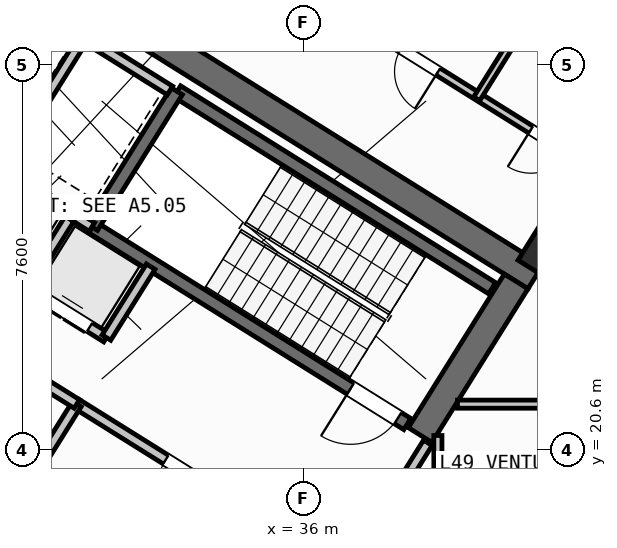
"""IFC4 building model, lengths in metres.
Left out: names, types, materials, properties, quantities, classifications, styles, units other than length and angle.
Written with IfcOpenShell. Run it as: python <this file> out.ifc"""

import sys

from ifc_helpers import new_model, si_unit, direction, frame, frame_2d, origin, origin_2d, place, context, subcontext, project, spatial, rectangle, hollow_rectangle, extrude, source, transform, mapped, element, fill, save


model = new_model("IFC4")
c1 = context("Model", 3, precision=1e-05, world=origin(), true_north=direction((0.0, 1.0)))
c2 = subcontext(c1, "Body", "Model", "MODEL_VIEW")
j1 = project(units=[si_unit("LENGTHUNIT", "METRE"), si_unit("PLANEANGLEUNIT", "RADIAN")], contexts=[c1])
p1 = place(None, origin())
s1 = spatial("IfcSite", under=j1, at=p1, CompositionType="ELEMENT")
p2 = place(p1, origin())
s2 = spatial("IfcBuilding", under=s1, at=p2, CompositionType="ELEMENT")
p3 = place(p2, frame((0.0, 0.0, 195.0)))
s3 = spatial("IfcBuildingStorey", under=s2, at=p3, CompositionType="ELEMENT", Elevation=195.0)
p4 = place(p3, frame((40.573, 24.01, 0.0), z_axis=(0.0, 0.0, 1.0), x_axis=(-0.848047359947, 0.529920442413, 0.0)))
e1 = element("IfcWall", 1, at=p4, inside=s3, PredefinedType="SHEAR", context=c2, shape_type="SweptSolid", body=[
    extrude(rectangle(XDim=13.14, YDim=0.55, at=frame_2d((6.57, 0.0))), origin(), (0.0, 0.0, 1.0), 4.22),
])
p5 = place(p3, frame((40.194, 23.922, 0.0), z_axis=(0.0, 0.0, 1.0), x_axis=(-0.529888438328, -0.848067357541, 0.0)))
e2 = element("IfcWall", 2, at=p5, inside=s3, PredefinedType="SHEAR", context=c2, shape_type="SweptSolid", body=[
    extrude(rectangle(XDim=3.575, YDim=0.55, at=frame_2d((1.788, 0.0))), origin(), (0.0, 0.0, 1.0), 4.22),
])
m1 = source(origin(), c2, "Body", "SweptSolid", [
    extrude(hollow_rectangle(XDim=0.8, YDim=0.8, WallThickness=0.032, at=origin_2d()), origin(), (0.0, 0.0, 1.0), 4.5),
])
p6 = place(p3, frame((40.783, 24.469, 0.0), z_axis=(0.0, 0.0, 1.0), x_axis=(-0.848048096156, 0.529919264233, 0.0)))
e3 = element("IfcColumn", 3, at=p6, inside=s3, PredefinedType="COLUMN", context=c2, shape_type="MappedRepresentation", body=[
    mapped(m1, transform((0.0, 0.0, 0.0), scale=1.0)),
])
p7 = place(p3, frame((31.76, 12.183, 0.0), z_axis=(0.0, 0.0, 1.0), x_axis=(-0.848047074256, 0.529920899612, 0.0)))
e4 = element("IfcWall", 4, at=p7, inside=s3, PredefinedType="STANDARD", context=c2, shape_type="SweptSolid", body=[
    extrude(rectangle(XDim=30.652, YDim=0.32, at=frame_2d((15.326, 0.0))), origin(), (0.0, 0.0, 1.0), 4.22),
])
p8 = place(p7, frame((15.166, 0.0, 0.0)))
e5 = element("IfcOpeningElement", 5, at=p8, cuts=e4, PredefinedType="OPENING", context=c2, shape_type="SweptSolid", body=[
    extrude(rectangle(XDim=1.2, YDim=2.15, at=frame_2d((0.6, 1.075))), frame((0.0, 0.17, 0.0), z_axis=(0.0, -1.0, 0.0), x_axis=(1.0, 0.0, 0.0)), (0.0, 0.0, 1.0), 0.34),
])
p9 = place(p7, frame((1.765, 0.0, 0.7)))
e6 = element("IfcOpeningElement", 6, at=p9, cuts=e4, PredefinedType="OPENING", context=c2, shape_type="SweptSolid", body=[
    extrude(rectangle(XDim=2.6, YDim=2.0, at=frame_2d((1.3, 1.0))), frame((0.0, 0.17, 0.0), z_axis=(0.0, -1.0, 0.0), x_axis=(1.0, 0.0, 0.0)), (0.0, 0.0, 1.0), 0.34),
])
p10 = place(p7, frame((6.994, 0.0, 0.7)))
e7 = element("IfcOpeningElement", 7, at=p10, cuts=e4, PredefinedType="OPENING", context=c2, shape_type="SweptSolid", body=[
    extrude(rectangle(XDim=2.6, YDim=2.0, at=frame_2d((1.3, 1.0))), frame((0.0, 0.17, 0.0), z_axis=(0.0, -1.0, 0.0), x_axis=(1.0, 0.0, 0.0)), (0.0, 0.0, 1.0), 0.34),
])
p11 = place(p7, frame((19.101, 0.0, 0.85)))
e8 = element("IfcOpeningElement", 8, at=p11, cuts=e4, PredefinedType="OPENING", context=c2, shape_type="SweptSolid", body=[
    extrude(rectangle(XDim=1.6, YDim=1.8, at=frame_2d((0.8, 0.9))), frame((0.0, 0.17, 0.0), z_axis=(0.0, -1.0, 0.0), x_axis=(1.0, 0.0, 0.0)), (0.0, 0.0, 1.0), 0.34),
])
p12 = place(p7, frame((26.358, 0.0, 0.7)))
e9 = element("IfcOpeningElement", 9, at=p12, cuts=e4, PredefinedType="OPENING", context=c2, shape_type="SweptSolid", body=[
    extrude(rectangle(XDim=2.6, YDim=2.0, at=frame_2d((1.3, 1.0))), frame((0.0, 0.17, 0.0), z_axis=(0.0, -1.0, 0.0), x_axis=(1.0, 0.0, 0.0)), (0.0, 0.0, 1.0), 0.34),
])
p13 = place(p3, frame((31.28, 18.261, 0.0), z_axis=(0.0, 0.0, 1.0), x_axis=(-0.848051618787, 0.529913626805, 0.0)))
e10 = element("IfcWall", 10, at=p13, inside=s3, PredefinedType="SHEAR", context=c2, shape_type="SweptSolid", body=[
    extrude(rectangle(XDim=7.46, YDim=0.26, at=frame_2d((3.73, 0.0))), origin(), (0.0, 0.0, 1.0), 4.22),
])
p14 = place(p13, frame((0.36, 0.0, 0.0)))
e11 = element("IfcOpeningElement", 11, at=p14, cuts=e10, PredefinedType="OPENING", context=c2, shape_type="SweptSolid", body=[
    extrude(rectangle(XDim=0.86, YDim=2.05, at=frame_2d((0.43, 1.025))), frame((0.0, 0.14, 0.0), z_axis=(0.0, -1.0, 0.0), x_axis=(1.0, 0.0, 0.0)), (0.0, 0.0, 1.0), 0.28),
])
p15 = place(p3, frame((39.721, 23.788, 0.0), z_axis=(0.0, 0.0, 1.0), x_axis=(-0.848054434086, 0.529909121291, 0.0)))
e12 = element("IfcWall", 12, at=p15, inside=s3, PredefinedType="SHEAR", context=c2, shape_type="SweptSolid", body=[
    extrude(rectangle(XDim=7.33, YDim=0.26, at=frame_2d((3.665, 0.0))), origin(), (0.0, 0.0, 1.0), 4.22),
])
p16 = place(p3, frame((38.046, 21.108, 0.0), z_axis=(0.0, 0.0, 1.0), x_axis=(-0.848054434086, 0.529909121291, 0.0)))
e13 = element("IfcWall", 13, at=p16, inside=s3, PredefinedType="SHEAR", context=c2, shape_type="SweptSolid", body=[
    extrude(rectangle(XDim=7.33, YDim=0.26, at=frame_2d((3.665, 0.0))), origin(), (0.0, 0.0, 1.0), 4.22),
])
p17 = place(p16, frame((0.22, 0.0, 0.0)))
e14 = element("IfcOpeningElement", 14, at=p17, cuts=e13, PredefinedType="OPENING", context=c2, shape_type="SweptSolid", body=[
    extrude(rectangle(XDim=1.1, YDim=2.1, at=frame_2d((0.55, 1.05))), frame((0.0, 0.14, 0.0), z_axis=(0.0, -1.0, 0.0), x_axis=(1.0, 0.0, 0.0)), (0.0, 0.0, 1.0), 0.28),
])
p18 = place(p3, frame((33.496, 27.677, 0.0), z_axis=(0.0, 0.0, 1.0), x_axis=(-0.529908658664, -0.84805472316, 0.0)))
e15 = element("IfcWall", 15, at=p18, inside=s3, PredefinedType="SHEAR", context=c2, shape_type="SweptSolid", body=[
    extrude(rectangle(XDim=3.16, YDim=0.26, at=frame_2d((1.58, 0.0))), origin(), (0.0, 0.0, 1.0), 4.22),
])
p19 = place(p3, frame((36.417, 18.447, 0.0), z_axis=(0.0, 0.0, 1.0), x_axis=(-0.848064879198, 0.529892404805, 0.0)))
e16 = element("IfcWall", 16, at=p19, inside=s3, PredefinedType="STANDARD", context=c2, shape_type="SweptSolid", body=[
    extrude(rectangle(XDim=5.768, YDim=0.2, at=frame_2d((2.884, 0.0))), origin(), (0.0, 0.0, 1.0), 4.21),
])
p20 = place(p19, frame((2.548, 0.0, 0.0)))
e17 = element("IfcOpeningElement", 17, at=p20, cuts=e16, PredefinedType="OPENING", context=c2, shape_type="SweptSolid", body=[
    extrude(rectangle(XDim=1.15, YDim=2.1, at=frame_2d((0.575, 1.05))), frame((0.0, 0.11, 0.0), z_axis=(0.0, -1.0, 0.0), x_axis=(1.0, 0.0, 0.0)), (0.0, 0.0, 1.0), 0.22),
])
p21 = place(p3, frame((31.822, 24.998, 0.0), z_axis=(0.0, 0.0, 1.0), x_axis=(-0.848036912365, 0.52993716162, 0.0)))
e18 = element("IfcWall", 18, at=p21, inside=s3, PredefinedType="STANDARD", context=c2, shape_type="SweptSolid", body=[
    extrude(rectangle(XDim=4.618, YDim=0.2, at=frame_2d((2.309, 0.0))), origin(), (0.0, 0.0, 1.0), 4.21),
])
p22 = place(p3, frame((32.108, 22.814, 0.0), z_axis=(0.0, 0.0, 1.0), x_axis=(-0.848042229521, 0.529928652696, 0.0)))
e19 = element("IfcWall", 19, at=p22, inside=s3, PredefinedType="STANDARD", context=c2, shape_type="SweptSolid", body=[
    extrude(rectangle(XDim=5.62, YDim=0.2, at=frame_2d((2.81, 0.0))), origin(), (0.0, 0.0, 1.0), 4.21),
])
p23 = place(p22, frame((0.39, 0.0, 0.0)))
e20 = element("IfcOpeningElement", 20, at=p23, cuts=e19, PredefinedType="OPENING", context=c2, shape_type="SweptSolid", body=[
    extrude(rectangle(XDim=1.1, YDim=2.15, at=frame_2d((0.55, 1.075))), frame((0.0, 0.11, 0.0), z_axis=(0.0, -1.0, 0.0), x_axis=(1.0, 0.0, 0.0)), (0.0, 0.0, 1.0), 0.22),
])
p24 = place(p22, frame((2.25, 0.0, 0.0)))
e21 = element("IfcOpeningElement", 21, at=p24, cuts=e19, PredefinedType="OPENING", context=c2, shape_type="SweptSolid", body=[
    extrude(rectangle(XDim=1.1, YDim=2.15, at=frame_2d((0.55, 1.075))), frame((0.0, 0.11, 0.0), z_axis=(0.0, -1.0, 0.0), x_axis=(1.0, 0.0, 0.0)), (0.0, 0.0, 1.0), 0.22),
])
p25 = place(p22, frame((4.11, 0.0, 0.0)))
e22 = element("IfcOpeningElement", 22, at=p25, cuts=e19, PredefinedType="OPENING", context=c2, shape_type="SweptSolid", body=[
    extrude(rectangle(XDim=1.1, YDim=2.15, at=frame_2d((0.55, 1.075))), frame((0.0, 0.11, 0.0), z_axis=(0.0, -1.0, 0.0), x_axis=(1.0, 0.0, 0.0)), (0.0, 0.0, 1.0), 0.22),
])
p26 = place(p3, frame((32.982, 24.213, 0.0), z_axis=(0.0, 0.0, 1.0), x_axis=(-0.529839334948, -0.84809803628, 0.0)))
e23 = element("IfcWall", 23, at=p26, inside=s3, PredefinedType="STANDARD", context=c2, shape_type="SweptSolid", body=[
    extrude(rectangle(XDim=1.65, YDim=0.2, at=frame_2d((0.825, 0.0))), origin(), (0.0, 0.0, 1.0), 4.21),
])
p27 = place(p3, frame((31.645, 28.716, 0.0), z_axis=(0.0, 0.0, 1.0), x_axis=(-0.52986693015, -0.848080795876, 0.0)))
e24 = element("IfcWall", 24, at=p27, inside=s3, PredefinedType="STANDARD", context=c2, shape_type="SweptSolid", body=[
    extrude(rectangle(XDim=2.66, YDim=0.2, at=frame_2d((1.33, 0.0))), origin(), (0.0, 0.0, 1.0), 4.21),
])
p28 = place(p3, frame((33.363, 27.69, 0.0), z_axis=(0.0, 0.0, 1.0), x_axis=(-0.848047090064, 0.529920874315, 0.0)))
e25 = element("IfcWall", 25, at=p28, inside=s3, PredefinedType="STANDARD", context=c2, shape_type="SweptSolid", body=[
    extrude(rectangle(XDim=4.498, YDim=0.2, at=frame_2d((2.249, 0.0))), origin(), (0.0, 0.0, 1.0), 4.21),
])
p29 = place(p3, frame((31.379, 25.156, 0.0), z_axis=(0.0, 0.0, 1.0), x_axis=(-0.529998940003, -0.847998304005, 0.0)))
e26 = element("IfcWall", 26, at=p29, inside=s3, PredefinedType="STANDARD", context=c2, shape_type="SweptSolid", body=[
    extrude(rectangle(XDim=1.58, YDim=0.2, at=frame_2d((0.79, 0.0))), origin(), (0.0, 0.0, 1.0), 4.21),
])
p30 = place(p3, frame((31.525, 21.504, 0.0), z_axis=(0.0, 0.0, 1.0), x_axis=(-0.529907497854, -0.848055448493, 0.0)))
e27 = element("IfcWall", 27, at=p30, inside=s3, PredefinedType="STANDARD", context=c2, shape_type="SweptSolid", body=[
    extrude(rectangle(XDim=2.88, YDim=0.2, at=frame_2d((1.44, 0.0))), origin(), (0.0, 0.0, 1.0), 4.21),
])
p31 = place(p3, frame((31.525, 21.504, 0.0), z_axis=(0.0, 0.0, 1.0), x_axis=(-0.848040211232, 0.529931882541, 0.0)))
e28 = element("IfcWall", 28, at=p31, inside=s3, PredefinedType="STANDARD", context=c2, shape_type="SweptSolid", body=[
    extrude(rectangle(XDim=6.218, YDim=0.2, at=frame_2d((3.109, 0.0))), origin(), (0.0, 0.0, 1.0), 4.21),
])
p32 = place(p31, frame((4.4, 0.0, 0.0)))
e29 = element("IfcOpeningElement", 29, at=p32, cuts=e28, PredefinedType="OPENING", context=c2, shape_type="SweptSolid", body=[
    extrude(rectangle(XDim=0.86, YDim=2.05, at=frame_2d((0.43, 1.025))), frame((0.0, 0.11, 0.0), z_axis=(0.0, -1.0, 0.0), x_axis=(1.0, 0.0, 0.0)), (0.0, 0.0, 1.0), 0.22),
])
p33 = place(p31, frame((1.45, 0.0, 0.0)))
e30 = element("IfcOpeningElement", 30, at=p33, cuts=e28, PredefinedType="OPENING", context=c2, shape_type="SweptSolid", body=[
    extrude(rectangle(XDim=0.86, YDim=2.05, at=frame_2d((0.43, 1.025))), frame((0.0, 0.11, 0.0), z_axis=(0.0, -1.0, 0.0), x_axis=(1.0, 0.0, 0.0)), (0.0, 0.0, 1.0), 0.22),
])
p34 = place(p3, frame((41.936, 26.012, 0.0), z_axis=(0.0, 0.0, 1.0), x_axis=(-0.848051154596, 0.529914369676, 0.0)))
e31 = element("IfcWall", 31, at=p34, inside=s3, PredefinedType="PARTITIONING", context=c2, shape_type="SweptSolid", body=[
    extrude(rectangle(XDim=15.57, YDim=0.16, at=frame_2d((7.785, 0.0))), origin(), (0.0, 0.0, 1.0), 4.21),
])
p35 = place(p34, frame((0.85, 0.0, 0.0)))
e32 = element("IfcOpeningElement", 32, at=p35, cuts=e31, PredefinedType="OPENING", context=c2, shape_type="SweptSolid", body=[
    extrude(rectangle(XDim=0.86, YDim=2.05, at=frame_2d((0.43, 1.025))), frame((0.0, 0.09, 0.0), z_axis=(0.0, -1.0, 0.0), x_axis=(1.0, 0.0, 0.0)), (0.0, 0.0, 1.0), 0.18),
])
p36 = place(p34, frame((3.87, 0.0, 0.0)))
e33 = element("IfcOpeningElement", 33, at=p36, cuts=e31, PredefinedType="OPENING", context=c2, shape_type="SweptSolid", body=[
    extrude(rectangle(XDim=0.86, YDim=2.05, at=frame_2d((0.43, 1.025))), frame((0.0, 0.09, 0.0), z_axis=(0.0, -1.0, 0.0), x_axis=(1.0, 0.0, 0.0)), (0.0, 0.0, 1.0), 0.18),
])
p37 = place(p34, frame((6.33, 0.0, 0.0)))
e34 = element("IfcOpeningElement", 34, at=p37, cuts=e31, PredefinedType="OPENING", context=c2, shape_type="SweptSolid", body=[
    extrude(rectangle(XDim=0.78, YDim=2.05, at=frame_2d((0.39, 1.025))), frame((0.0, 0.09, 0.0), z_axis=(0.0, -1.0, 0.0), x_axis=(1.0, 0.0, 0.0)), (0.0, 0.0, 1.0), 0.18),
])
p38 = place(p34, frame((8.78, 0.0, 0.0)))
e35 = element("IfcOpeningElement", 35, at=p38, cuts=e31, PredefinedType="OPENING", context=c2, shape_type="SweptSolid", body=[
    extrude(rectangle(XDim=0.78, YDim=2.05, at=frame_2d((0.39, 1.025))), frame((0.0, 0.09, 0.0), z_axis=(0.0, -1.0, 0.0), x_axis=(1.0, 0.0, 0.0)), (0.0, 0.0, 1.0), 0.18),
])
p39 = place(p34, frame((11.18, 0.0, 0.0)))
e36 = element("IfcOpeningElement", 36, at=p39, cuts=e31, PredefinedType="OPENING", context=c2, shape_type="SweptSolid", body=[
    extrude(rectangle(XDim=0.78, YDim=2.05, at=frame_2d((0.39, 1.025))), frame((0.0, 0.09, 0.0), z_axis=(0.0, -1.0, 0.0), x_axis=(1.0, 0.0, 0.0)), (0.0, 0.0, 1.0), 0.18),
])
p40 = place(p3, frame((40.512, 29.281, 0.0), z_axis=(0.0, 0.0, 1.0), x_axis=(-0.529935255849, -0.848038103276, 0.0)))
e37 = element("IfcWall", 37, at=p40, inside=s3, PredefinedType="PLUMBINGWALL", context=c2, shape_type="SweptSolid", body=[
    extrude(rectangle(XDim=2.068, YDim=0.14, at=frame_2d((1.034, 0.0))), origin(), (0.0, 0.0, 1.0), 4.21),
])
p41 = place(p3, frame((38.451, 20.737, 0.0), z_axis=(0.0, 0.0, 1.0), x_axis=(-0.529924799939, -0.848044637038, 0.0)))
e38 = element("IfcWall", 38, at=p41, inside=s3, PredefinedType="STANDARD", context=c2, shape_type="SweptSolid", body=[
    extrude(rectangle(XDim=2.96, YDim=0.2, at=frame_2d((1.48, 0.0))), origin(), (0.0, 0.0, 1.0), 4.21),
])
p42 = place(p41, frame((1.46, 0.0, 0.0)))
e39 = element("IfcOpeningElement", 39, at=p42, cuts=e38, PredefinedType="OPENING", context=c2, shape_type="SweptSolid", body=[
    extrude(rectangle(XDim=0.86, YDim=2.05, at=frame_2d((0.43, 1.025))), frame((0.0, 0.11, 0.0), z_axis=(0.0, -1.0, 0.0), x_axis=(1.0, 0.0, 0.0)), (0.0, 0.0, 1.0), 0.22),
])
p43 = place(p3, frame((38.65, 17.93, 0.0), z_axis=(0.0, 0.0, 1.0), x_axis=(0.0, 1.0, 0.0)))
e40 = element("IfcWall", 40, at=p43, inside=s3, PredefinedType="PARTITIONING", context=c2, shape_type="SweptSolid", body=[
    extrude(rectangle(XDim=2.951, YDim=0.16, at=frame_2d((1.476, 0.0))), origin(), (0.0, 0.0, 1.0), 4.21),
])
p44 = place(p3, frame((39.037, 21.5, 0.0), z_axis=(0.0, 0.0, 1.0), x_axis=(1.0, 0.0, 0.0)))
e41 = element("IfcWall", 41, at=p44, inside=s3, PredefinedType="PARTITIONING", context=c2, shape_type="SweptSolid", body=[
    extrude(rectangle(XDim=7.215, YDim=0.16, at=frame_2d((3.607, 0.0))), origin(), (0.0, 0.0, 1.0), 4.21),
])
m2 = source(origin(), c2, "Body", "SweptSolid", [
    extrude(rectangle(XDim=1.1, YDim=2.1, at=frame_2d((0.55, 1.05))), frame((0.0, 0.025, 0.0), z_axis=(0.0, -1.0, 0.0), x_axis=(1.0, 0.0, 0.0)), (0.0, 0.0, 1.0), 0.05),
])
p45 = place(p17, origin())
e42 = element("IfcDoor", 42, at=p45, inside=s3, OperationType="SINGLE_SWING_RIGHT", PredefinedType="DOOR", context=c2, shape_type="MappedRepresentation", body=[
    mapped(m2, transform((0.0, 0.0, 0.0), scale=1.0)),
])
fill(e14, e42)
m3 = source(origin(), c2, "Body", "SweptSolid", [
    extrude(rectangle(XDim=1.15, YDim=2.1, at=frame_2d((0.575, 1.05))), frame((0.0, 0.025, 0.0), z_axis=(0.0, -1.0, 0.0), x_axis=(1.0, 0.0, 0.0)), (0.0, 0.0, 1.0), 0.05),
])
p46 = place(p20, origin())
e43 = element("IfcDoor", 43, at=p46, inside=s3, OperationType="SINGLE_SWING_LEFT", PredefinedType="DOOR", context=c2, shape_type="MappedRepresentation", body=[
    mapped(m3, transform((0.0, 0.0, 0.0), scale=1.0)),
])
fill(e17, e43)
m4 = source(origin(), c2, "Body", "SweptSolid", [
    extrude(rectangle(XDim=1.1, YDim=2.15, at=frame_2d((0.55, 1.075))), frame((0.0, 0.025, 0.0), z_axis=(0.0, -1.0, 0.0), x_axis=(1.0, 0.0, 0.0)), (0.0, 0.0, 1.0), 0.05),
])
p47 = place(p23, origin())
e44 = element("IfcDoor", 44, at=p47, inside=s3, OperationType="DOUBLE_DOOR_SLIDING", PredefinedType="DOOR", context=c2, shape_type="MappedRepresentation", body=[
    mapped(m4, transform((0.0, 0.0, 0.0), scale=1.0)),
])
fill(e20, e44)
m5 = source(origin(), c2, "Body", "SweptSolid", [
    extrude(rectangle(XDim=0.86, YDim=2.05, at=frame_2d((0.43, 1.025))), frame((0.0, 0.025, 0.0), z_axis=(0.0, -1.0, 0.0), x_axis=(1.0, 0.0, 0.0)), (0.0, 0.0, 1.0), 0.05),
])
p48 = place(p35, origin())
e45 = element("IfcDoor", 45, at=p48, inside=s3, OperationType="SINGLE_SWING_RIGHT", PredefinedType="DOOR", context=c2, shape_type="MappedRepresentation", body=[
    mapped(m5, transform((0.0, 0.0, 0.0), scale=1.0)),
])
fill(e32, e45)
p49 = place(p36, origin())
e46 = element("IfcDoor", 46, at=p49, inside=s3, OperationType="SINGLE_SWING_LEFT", PredefinedType="DOOR", context=c2, shape_type="MappedRepresentation", body=[
    mapped(m5, transform((0.0, 0.0, 0.0), scale=1.0)),
])
fill(e33, e46)
save(model, sys.argv[1])
